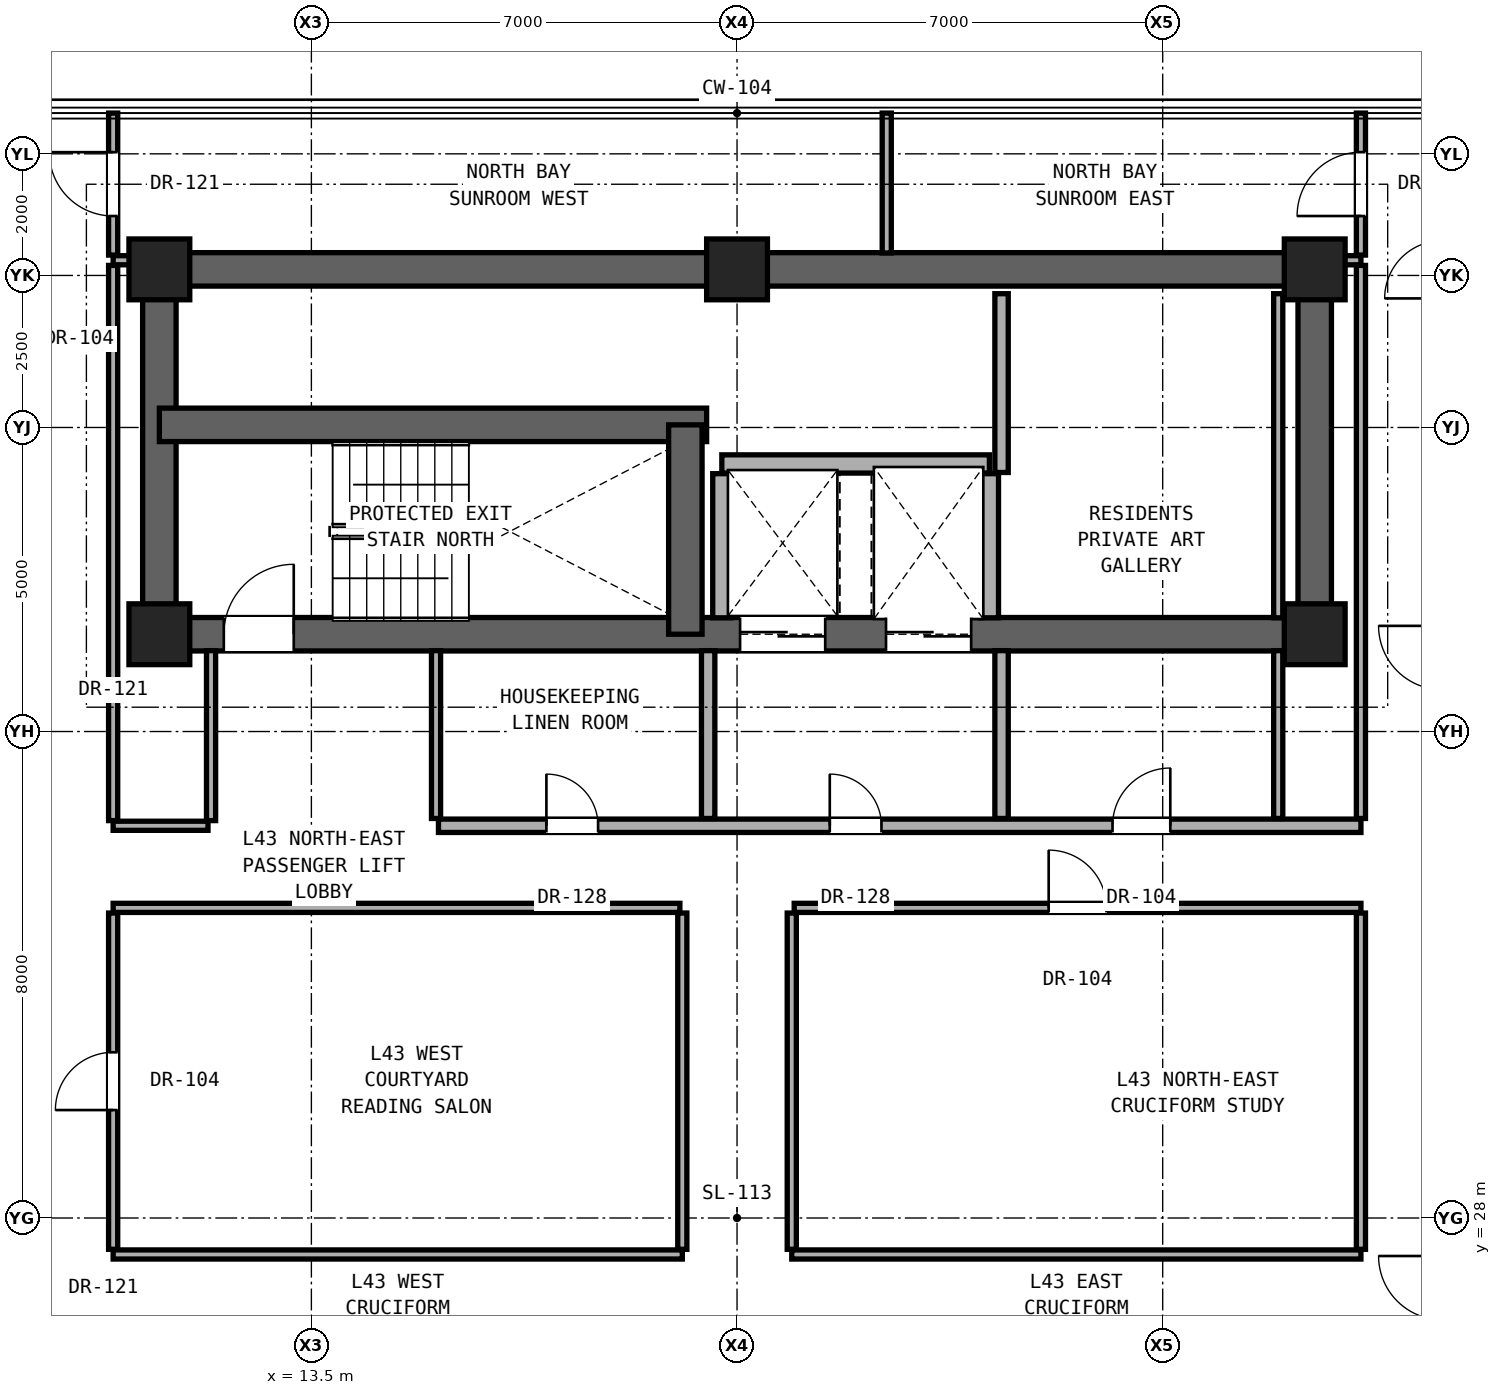
"""IFC4 building model, lengths in metres.
Left out: names, types, materials, properties, quantities, classifications, styles, units other than length and angle.
Written with IfcOpenShell. Run it as: python <this file> out.ifc"""

import sys

from ifc_helpers import new_model, si_unit, direction, frame, frame_2d, origin, origin_2d, place, context, subcontext, project, spatial, rectangle, extrude, element, fill, save


model = new_model("IFC4")
c1 = context("Model", 3, precision=1e-05, world=origin(), true_north=direction((0.0, 1.0)))
c2 = subcontext(c1, "Body", "Model", "MODEL_VIEW")
j1 = project(units=[si_unit("LENGTHUNIT", "METRE"), si_unit("PLANEANGLEUNIT", "RADIAN")], contexts=[c1])
p1 = place(None, origin())
s1 = spatial("IfcSite", under=j1, at=p1, CompositionType="ELEMENT")
p2 = place(p1, origin())
s2 = spatial("IfcBuilding", under=s1, at=p2, CompositionType="ELEMENT")
p3 = place(p2, frame((0.0, 0.0, 154.4)))
s3 = spatial("IfcBuildingStorey", under=s2, at=p3, CompositionType="ELEMENT", Elevation=154.4)
for number, where, z_axis, x_axis in (
    (1, (11.0, 37.6, 0.0), (0.0, 0.0, 1.0), (1.0, 0.0, 0.0)),
    (2, (30.0, 37.6, 0.0), (0.0, 0.0, 1.0), (1.0, 0.0, 0.0)),
    (3, (11.0, 43.6, 0.0), (0.0, 0.0, 1.0), (1.0, 0.0, 0.0)),
    (4, (20.5, 43.6, 0.0), (0.0, 0.0, 1.0), (1.0, 0.0, 0.0)),
    (5, (30.0, 43.6, 0.0), (0.0, 0.0, 1.0), (1.0, 0.0, 0.0)),
):
    element("IfcColumn", number, at=place(p3, frame(where, z_axis=z_axis, x_axis=x_axis)), inside=s3, PredefinedType="COLUMN", context=c2, shape_type="SweptSolid", body=[
        extrude(rectangle(XDim=1.0, YDim=1.0, at=origin_2d()), origin(), (0.0, 0.0, 1.0), 3.25),
    ])
p4 = place(p3, frame((11.0, 43.6, 0.0), z_axis=(0.0, 0.0, 1.0), x_axis=(1.0, 0.0, 0.0)))
e6 = element("IfcWall", 6, at=p4, inside=s3, PredefinedType="SHEAR", context=c2, shape_type="SweptSolid", body=[
    extrude(rectangle(XDim=19.0, YDim=0.55, at=frame_2d((9.5, 0.0))), origin(), (0.0, 0.0, 1.0), 3.05),
])
for number, where, z_axis, x_axis in (
    (7, (11.0, 37.6, 0.0), (0.0, 0.0, 1.0), (0.0, 1.0, 0.0)),
    (8, (30.0, 37.6, 0.0), (0.0, 0.0, 1.0), (0.0, 1.0, 0.0)),
):
    element("IfcWall", number, at=place(p3, frame(where, z_axis=z_axis, x_axis=x_axis)), inside=s3, PredefinedType="SHEAR", context=c2, shape_type="SweptSolid", body=[
        extrude(rectangle(XDim=6.0, YDim=0.55, at=frame_2d((3.0, 0.0))), origin(), (0.0, 0.0, 1.0), 3.05),
    ])
p5 = place(p3, frame((11.0, 37.6, 0.0), z_axis=(0.0, 0.0, 1.0), x_axis=(1.0, 0.0, 0.0)))
e9 = element("IfcWall", 9, at=p5, inside=s3, PredefinedType="SHEAR", context=c2, shape_type="SweptSolid", body=[
    extrude(rectangle(XDim=19.0, YDim=0.55, at=frame_2d((9.5, 0.0))), origin(), (0.0, 0.0, 1.0), 3.05),
])
p6 = place(p5, frame((1.06, 0.0, 0.0)))
e10 = element("IfcOpeningElement", 10, at=p6, cuts=e9, PredefinedType="OPENING", context=c2, shape_type="SweptSolid", body=[
    extrude(rectangle(XDim=1.15, YDim=2.2, at=frame_2d((0.575, 1.1))), frame((0.0, 0.285, 0.0), z_axis=(0.0, -1.0, 0.0), x_axis=(1.0, 0.0, 0.0)), (0.0, 0.0, 1.0), 0.57),
])
p7 = place(p5, frame((9.55, 0.0, 0.0)))
e11 = element("IfcOpeningElement", 11, at=p7, cuts=e9, PredefinedType="OPENING", context=c2, shape_type="SweptSolid", body=[
    extrude(rectangle(XDim=1.4, YDim=2.35, at=frame_2d((0.7, 1.175))), frame((0.0, 0.285, 0.0), z_axis=(0.0, -1.0, 0.0), x_axis=(1.0, 0.0, 0.0)), (0.0, 0.0, 1.0), 0.57),
])
p8 = place(p5, frame((11.95, 0.0, 0.0)))
e12 = element("IfcOpeningElement", 12, at=p8, cuts=e9, PredefinedType="OPENING", context=c2, shape_type="SweptSolid", body=[
    extrude(rectangle(XDim=1.4, YDim=2.35, at=frame_2d((0.7, 1.175))), frame((0.0, 0.285, 0.0), z_axis=(0.0, -1.0, 0.0), x_axis=(1.0, 0.0, 0.0)), (0.0, 0.0, 1.0), 0.57),
])
p9 = place(p3, frame((11.0, 41.043, 0.0), z_axis=(0.0, 0.0, 1.0), x_axis=(1.0, 0.0, 0.0)))
e13 = element("IfcWall", 13, at=p9, inside=s3, PredefinedType="SHEAR", context=c2, shape_type="SweptSolid", body=[
    extrude(rectangle(XDim=9.0, YDim=0.55, at=frame_2d((4.5, 0.0))), origin(), (0.0, 0.0, 1.0), 3.05),
])
p10 = place(p3, frame((19.65, 37.6, 0.0), z_axis=(0.0, 0.0, 1.0), x_axis=(0.0, 1.0, 0.0)))
e14 = element("IfcWall", 14, at=p10, inside=s3, PredefinedType="SHEAR", context=c2, shape_type="SweptSolid", body=[
    extrude(rectangle(XDim=3.443, YDim=0.55, at=frame_2d((1.721, 0.0))), origin(), (0.0, 0.0, 1.0), 3.05),
])
for number, where, z_axis, x_axis in (
    (15, (10.24, 27.4, 0.0), (0.0, 0.0, 1.0), (1.0, 0.0, 0.0)),
    (16, (21.4, 27.4, 0.0), (0.0, 0.0, 1.0), (1.0, 0.0, 0.0)),
):
    element("IfcWall", number, at=place(p3, frame(where, z_axis=z_axis, x_axis=x_axis)), inside=s3, PredefinedType="PARTITIONING", context=c2, shape_type="SweptSolid", body=[
        extrude(rectangle(XDim=9.36, YDim=0.15, at=frame_2d((4.68, 0.0))), origin(), (0.0, 0.0, 1.0), 2.186),
    ])
p11 = place(p3, frame((10.24, 33.1, 0.0), z_axis=(0.0, 0.0, 1.0), x_axis=(1.0, 0.0, 0.0)))
e17 = element("IfcWall", 17, at=p11, inside=s3, PredefinedType="PARTITIONING", context=c2, shape_type="SweptSolid", body=[
    extrude(rectangle(XDim=9.32, YDim=0.15, at=frame_2d((4.66, 0.0))), origin(), (0.0, 0.0, 1.0), 2.186),
])
p12 = place(p3, frame((21.44, 33.1, 0.0), z_axis=(0.0, 0.0, 1.0), x_axis=(1.0, 0.0, 0.0)))
e18 = element("IfcWall", 18, at=p12, inside=s3, PredefinedType="PARTITIONING", context=c2, shape_type="SweptSolid", body=[
    extrude(rectangle(XDim=9.32, YDim=0.15, at=frame_2d((4.66, 0.0))), origin(), (0.0, 0.0, 1.0), 2.186),
])
p13 = place(p12, frame((4.185, 0.0, 0.0)))
e19 = element("IfcOpeningElement", 19, at=p13, cuts=e18, PredefinedType="OPENING", context=c2, shape_type="SweptSolid", body=[
    extrude(rectangle(XDim=0.95, YDim=2.15, at=frame_2d((0.475, 1.075))), frame((0.0, 0.085, 0.0), z_axis=(0.0, -1.0, 0.0), x_axis=(1.0, 0.0, 0.0)), (0.0, 0.0, 1.0), 0.17),
])
p14 = place(p3, frame((10.24, 34.45, 0.0), z_axis=(0.0, 0.0, 1.0), x_axis=(1.0, 0.0, 0.0)))
e20 = element("IfcWall", 20, at=p14, inside=s3, PredefinedType="PARTITIONING", context=c2, shape_type="SweptSolid", body=[
    extrude(rectangle(XDim=1.56, YDim=0.15, at=frame_2d((0.78, 0.0))), origin(), (0.0, 0.0, 1.0), 2.186),
])
p15 = place(p3, frame((15.59, 34.45, 0.0), z_axis=(0.0, 0.0, 1.0), x_axis=(1.0, 0.0, 0.0)))
e21 = element("IfcWall", 21, at=p15, inside=s3, PredefinedType="SOLIDWALL", context=c2, shape_type="SweptSolid", body=[
    extrude(rectangle(XDim=15.17, YDim=0.22, at=frame_2d((7.585, 0.0))), origin(), (0.0, 0.0, 1.0), 2.186),
])
p16 = place(p15, frame((6.435, 0.0, 0.0)))
e22 = element("IfcOpeningElement", 22, at=p16, cuts=e21, PredefinedType="OPENING", context=c2, shape_type="SweptSolid", body=[
    extrude(rectangle(XDim=0.85, YDim=2.01, at=frame_2d((0.425, 1.005))), frame((0.0, 0.12, 0.0), z_axis=(0.0, -1.0, 0.0), x_axis=(1.0, 0.0, 0.0)), (0.0, 0.0, 1.0), 0.24),
])
p17 = place(p15, frame((11.085, 0.0, 0.0)))
e23 = element("IfcOpeningElement", 23, at=p17, cuts=e21, PredefinedType="OPENING", context=c2, shape_type="SweptSolid", body=[
    extrude(rectangle(XDim=0.95, YDim=2.15, at=frame_2d((0.475, 1.075))), frame((0.0, 0.12, 0.0), z_axis=(0.0, -1.0, 0.0), x_axis=(1.0, 0.0, 0.0)), (0.0, 0.0, 1.0), 0.24),
])
p18 = place(p15, frame((1.775, 0.0, 0.0)))
e24 = element("IfcOpeningElement", 24, at=p18, cuts=e21, PredefinedType="OPENING", context=c2, shape_type="SweptSolid", body=[
    extrude(rectangle(XDim=0.85, YDim=2.01, at=frame_2d((0.425, 1.005))), frame((0.0, 0.12, 0.0), z_axis=(0.0, -1.0, 0.0), x_axis=(1.0, 0.0, 0.0)), (0.0, 0.0, 1.0), 0.24),
])
p19 = place(p3, frame((20.25, 40.4, 0.0), z_axis=(0.0, 0.0, 1.0), x_axis=(1.0, 0.0, 0.0)))
e25 = element("IfcWall", 25, at=p19, inside=s3, PredefinedType="SOLIDWALL", context=c2, shape_type="SweptSolid", body=[
    extrude(rectangle(XDim=4.4, YDim=0.3, at=frame_2d((2.2, 0.0))), origin(), (0.0, 0.0, 1.0), 3.05),
])
for number, where, z_axis, x_axis in (
    (26, (10.24, 43.75, 0.0), (0.0, 0.0, 1.0), (1.0, 0.0, 0.0)),
    (27, (30.27, 43.75, 0.0), (0.0, 0.0, 1.0), (1.0, 0.0, 0.0)),
):
    element("IfcWall", number, at=place(p3, frame(where, z_axis=z_axis, x_axis=x_axis)), inside=s3, PredefinedType="PARTITIONING", context=c2, shape_type="SweptSolid", body=[
        extrude(rectangle(XDim=0.49, YDim=0.15, at=frame_2d((0.245, 0.0))), origin(), (0.0, 0.0, 1.0), 3.05),
    ])
p20 = place(p3, frame((10.24, 27.485, 0.0), z_axis=(0.0, 0.0, 1.0), x_axis=(0.0, 1.0, 0.0)))
e28 = element("IfcWall", 28, at=p20, inside=s3, PredefinedType="PARTITIONING", context=c2, shape_type="SweptSolid", body=[
    extrude(rectangle(XDim=5.53, YDim=0.15, at=frame_2d((2.765, 0.0))), origin(), (0.0, 0.0, 1.0), 2.346),
])
p21 = place(p20, frame((2.29, 0.0, 0.0)))
e29 = element("IfcOpeningElement", 29, at=p21, cuts=e28, PredefinedType="OPENING", context=c2, shape_type="SweptSolid", body=[
    extrude(rectangle(XDim=0.95, YDim=2.15, at=frame_2d((0.475, 1.075))), frame((0.0, 0.085, 0.0), z_axis=(0.0, -1.0, 0.0), x_axis=(1.0, 0.0, 0.0)), (0.0, 0.0, 1.0), 0.17),
])
p22 = place(p3, frame((10.24, 34.535, 0.0), z_axis=(0.0, 0.0, 1.0), x_axis=(0.0, 1.0, 0.0)))
e30 = element("IfcWall", 30, at=p22, inside=s3, PredefinedType="PARTITIONING", context=c2, shape_type="SweptSolid", body=[
    extrude(rectangle(XDim=9.13, YDim=0.15, at=frame_2d((4.565, 0.0))), origin(), (0.0, 0.0, 1.0), 2.442),
])
p23 = place(p3, frame((10.24, 43.835, 0.0), z_axis=(0.0, 0.0, 1.0), x_axis=(0.0, 1.0, 0.0)))
e31 = element("IfcWall", 31, at=p23, inside=s3, PredefinedType="PARTITIONING", context=c2, shape_type="SweptSolid", body=[
    extrude(rectangle(XDim=2.335, YDim=0.15, at=frame_2d((1.167, 0.0))), origin(), (0.0, 0.0, 1.0), 3.05),
])
p24 = place(p23, frame((0.643, 0.0, 0.0)))
e32 = element("IfcOpeningElement", 32, at=p24, cuts=e31, PredefinedType="OPENING", context=c2, shape_type="SweptSolid", body=[
    extrude(rectangle(XDim=1.05, YDim=2.2, at=frame_2d((0.525, 1.1))), frame((0.0, 0.085, 0.0), z_axis=(0.0, -1.0, 0.0), x_axis=(1.0, 0.0, 0.0)), (0.0, 0.0, 1.0), 0.17),
])
p25 = place(p3, frame((11.85, 34.535, 0.0), z_axis=(0.0, 0.0, 1.0), x_axis=(0.0, 1.0, 0.0)))
e33 = element("IfcWall", 33, at=p25, inside=s3, PredefinedType="PARTITIONING", context=c2, shape_type="SweptSolid", body=[
    extrude(rectangle(XDim=2.795, YDim=0.15, at=frame_2d((1.397, 0.0))), origin(), (0.0, 0.0, 1.0), 3.05),
])
p26 = place(p3, frame((15.55, 34.57, 0.0), z_axis=(0.0, 0.0, 1.0), x_axis=(0.0, 1.0, 0.0)))
e34 = element("IfcWall", 34, at=p26, inside=s3, PredefinedType="PARTITIONING", context=c2, shape_type="SweptSolid", body=[
    extrude(rectangle(XDim=2.76, YDim=0.15, at=frame_2d((1.38, 0.0))), origin(), (0.0, 0.0, 1.0), 3.05),
])
p27 = place(p3, frame((19.6, 27.485, 0.0), z_axis=(0.0, 0.0, 1.0), x_axis=(0.0, 1.0, 0.0)))
e35 = element("IfcWall", 35, at=p27, inside=s3, PredefinedType="PARTITIONING", context=c2, shape_type="SweptSolid", body=[
    extrude(rectangle(XDim=5.53, YDim=0.15, at=frame_2d((2.765, 0.0))), origin(), (0.0, 0.0, 1.0), 2.186),
])
p28 = place(p3, frame((20.025, 34.57, 0.0), z_axis=(0.0, 0.0, 1.0), x_axis=(0.0, 1.0, 0.0)))
e36 = element("IfcWall", 36, at=p28, inside=s3, PredefinedType="SOLIDWALL", context=c2, shape_type="SweptSolid", body=[
    extrude(rectangle(XDim=2.76, YDim=0.22, at=frame_2d((1.38, 0.0))), origin(), (0.0, 0.0, 1.0), 3.05),
])
p29 = place(p3, frame((20.25, 37.87, 0.0), z_axis=(0.0, 0.0, 1.0), x_axis=(0.0, 1.0, 0.0)))
e37 = element("IfcWall", 37, at=p29, inside=s3, PredefinedType="SOLIDWALL", context=c2, shape_type="SweptSolid", body=[
    extrude(rectangle(XDim=2.37, YDim=0.3, at=frame_2d((1.185, 0.0))), origin(), (0.0, 0.0, 1.0), 3.05),
])
p30 = place(p3, frame((21.4, 27.485, 0.0), z_axis=(0.0, 0.0, 1.0), x_axis=(0.0, 1.0, 0.0)))
e38 = element("IfcWall", 38, at=p30, inside=s3, PredefinedType="PARTITIONING", context=c2, shape_type="SweptSolid", body=[
    extrude(rectangle(XDim=5.53, YDim=0.15, at=frame_2d((2.765, 0.0))), origin(), (0.0, 0.0, 1.0), 2.186),
])
p31 = place(p3, frame((22.962, 43.87, 0.0), z_axis=(0.0, 0.0, 1.0), x_axis=(0.0, 1.0, 0.0)))
e39 = element("IfcWall", 39, at=p31, inside=s3, PredefinedType="PARTITIONING", context=c2, shape_type="SweptSolid", body=[
    extrude(rectangle(XDim=2.3, YDim=0.15, at=frame_2d((1.15, 0.0))), origin(), (0.0, 0.0, 1.0), 3.05),
])
p32 = place(p3, frame((24.65, 37.87, 0.0), z_axis=(0.0, 0.0, 1.0), x_axis=(0.0, 1.0, 0.0)))
e40 = element("IfcWall", 40, at=p32, inside=s3, PredefinedType="SOLIDWALL", context=c2, shape_type="SweptSolid", body=[
    extrude(rectangle(XDim=2.37, YDim=0.3, at=frame_2d((1.185, 0.0))), origin(), (0.0, 0.0, 1.0), 3.05),
])
p33 = place(p3, frame((24.85, 34.57, 0.0), z_axis=(0.0, 0.0, 1.0), x_axis=(0.0, 1.0, 0.0)))
e41 = element("IfcWall", 41, at=p33, inside=s3, PredefinedType="SOLIDWALL", context=c2, shape_type="SweptSolid", body=[
    extrude(rectangle(XDim=2.76, YDim=0.22, at=frame_2d((1.38, 0.0))), origin(), (0.0, 0.0, 1.0), 3.05),
])
p34 = place(p3, frame((24.85, 40.26, 0.0), z_axis=(0.0, 0.0, 1.0), x_axis=(0.0, 1.0, 0.0)))
e42 = element("IfcWall", 42, at=p34, inside=s3, PredefinedType="SOLIDWALL", context=c2, shape_type="SweptSolid", body=[
    extrude(rectangle(XDim=2.94, YDim=0.22, at=frame_2d((1.47, 0.0))), origin(), (0.0, 0.0, 1.0), 3.05),
])
p35 = place(p3, frame((29.4, 34.57, 0.0), z_axis=(0.0, 0.0, 1.0), x_axis=(0.0, 1.0, 0.0)))
e43 = element("IfcWall", 43, at=p35, inside=s3, PredefinedType="PARTITIONING", context=c2, shape_type="SweptSolid", body=[
    extrude(rectangle(XDim=2.76, YDim=0.15, at=frame_2d((1.38, 0.0))), origin(), (0.0, 0.0, 1.0), 3.05),
])
p36 = place(p3, frame((29.4, 37.87, 0.0), z_axis=(0.0, 0.0, 1.0), x_axis=(0.0, 1.0, 0.0)))
e44 = element("IfcWall", 44, at=p36, inside=s3, PredefinedType="PARTITIONING", context=c2, shape_type="SweptSolid", body=[
    extrude(rectangle(XDim=5.33, YDim=0.15, at=frame_2d((2.665, 0.0))), origin(), (0.0, 0.0, 1.0), 3.05),
])
p37 = place(p3, frame((30.76, 27.485, 0.0), z_axis=(0.0, 0.0, 1.0), x_axis=(0.0, 1.0, 0.0)))
e45 = element("IfcWall", 45, at=p37, inside=s3, PredefinedType="PARTITIONING", context=c2, shape_type="SweptSolid", body=[
    extrude(rectangle(XDim=5.53, YDim=0.15, at=frame_2d((2.765, 0.0))), origin(), (0.0, 0.0, 1.0), 2.346),
])
p38 = place(p3, frame((30.76, 34.57, 0.0), z_axis=(0.0, 0.0, 1.0), x_axis=(0.0, 1.0, 0.0)))
e46 = element("IfcWall", 46, at=p38, inside=s3, PredefinedType="PARTITIONING", context=c2, shape_type="SweptSolid", body=[
    extrude(rectangle(XDim=9.095, YDim=0.15, at=frame_2d((4.547, 0.0))), origin(), (0.0, 0.0, 1.0), 2.442),
])
p39 = place(p3, frame((30.76, 43.835, 0.0), z_axis=(0.0, 0.0, 1.0), x_axis=(0.0, 1.0, 0.0)))
e47 = element("IfcWall", 47, at=p39, inside=s3, PredefinedType="PARTITIONING", context=c2, shape_type="SweptSolid", body=[
    extrude(rectangle(XDim=2.335, YDim=0.15, at=frame_2d((1.167, 0.0))), origin(), (0.0, 0.0, 1.0), 3.05),
])
p40 = place(p39, frame((0.643, 0.0, 0.0)))
e48 = element("IfcOpeningElement", 48, at=p40, cuts=e47, PredefinedType="OPENING", context=c2, shape_type="SweptSolid", body=[
    extrude(rectangle(XDim=1.05, YDim=2.2, at=frame_2d((0.525, 1.1))), frame((0.0, 0.085, 0.0), z_axis=(0.0, -1.0, 0.0), x_axis=(1.0, 0.0, 0.0)), (0.0, 0.0, 1.0), 0.17),
])
p41 = place(p6, origin())
e49 = element("IfcDoor", 49, at=p41, inside=s3, OperationType="SINGLE_SWING_RIGHT", PredefinedType="DOOR", context=c2, shape_type="SweptSolid", body=[
    extrude(rectangle(XDim=1.15, YDim=2.2, at=frame_2d((0.575, 1.1))), frame((0.0, 0.025, 0.0), z_axis=(0.0, -1.0, 0.0), x_axis=(1.0, 0.0, 0.0)), (0.0, 0.0, 1.0), 0.05),
])
fill(e10, e49)
p42 = place(p16, origin())
e50 = element("IfcDoor", 50, at=p42, inside=s3, OperationType="SINGLE_SWING_LEFT", PredefinedType="DOOR", context=c2, shape_type="SweptSolid", body=[
    extrude(rectangle(XDim=0.85, YDim=2.01, at=frame_2d((0.425, 1.005))), frame((0.0, 0.025, 0.0), z_axis=(0.0, -1.0, 0.0), x_axis=(1.0, 0.0, 0.0)), (0.0, 0.0, 1.0), 0.05),
])
fill(e22, e50)
p43 = place(p17, origin())
e51 = element("IfcDoor", 51, at=p43, inside=s3, OperationType="SINGLE_SWING_RIGHT", PredefinedType="DOOR", context=c2, shape_type="SweptSolid", body=[
    extrude(rectangle(XDim=0.95, YDim=2.15, at=frame_2d((0.475, 1.075))), frame((0.0, 0.025, 0.0), z_axis=(0.0, -1.0, 0.0), x_axis=(1.0, 0.0, 0.0)), (0.0, 0.0, 1.0), 0.05),
])
fill(e23, e51)
p44 = place(p18, origin())
e52 = element("IfcDoor", 52, at=p44, inside=s3, OperationType="SINGLE_SWING_LEFT", PredefinedType="DOOR", context=c2, shape_type="SweptSolid", body=[
    extrude(rectangle(XDim=0.85, YDim=2.01, at=frame_2d((0.425, 1.005))), frame((0.0, 0.025, 0.0), z_axis=(0.0, -1.0, 0.0), x_axis=(1.0, 0.0, 0.0)), (0.0, 0.0, 1.0), 0.05),
])
fill(e24, e52)
p45 = place(p21, origin())
e53 = element("IfcDoor", 53, at=p45, inside=s3, OperationType="SINGLE_SWING_LEFT", PredefinedType="DOOR", context=c2, shape_type="SweptSolid", body=[
    extrude(rectangle(XDim=0.95, YDim=2.15, at=frame_2d((0.475, 1.075))), frame((0.0, 0.025, 0.0), z_axis=(0.0, -1.0, 0.0), x_axis=(1.0, 0.0, 0.0)), (0.0, 0.0, 1.0), 0.05),
])
fill(e29, e53)
p46 = place(p13, origin())
e54 = element("IfcDoor", 54, at=p46, inside=s3, OperationType="SINGLE_SWING_LEFT", PredefinedType="DOOR", context=c2, shape_type="SweptSolid", body=[
    extrude(rectangle(XDim=0.95, YDim=2.15, at=frame_2d((0.475, 1.075))), frame((0.0, 0.025, 0.0), z_axis=(0.0, -1.0, 0.0), x_axis=(1.0, 0.0, 0.0)), (0.0, 0.0, 1.0), 0.05),
])
fill(e19, e54)
p47 = place(p24, origin())
e55 = element("IfcDoor", 55, at=p47, inside=s3, OperationType="SINGLE_SWING_RIGHT", PredefinedType="DOOR", context=c2, shape_type="SweptSolid", body=[
    extrude(rectangle(XDim=1.05, YDim=2.2, at=frame_2d((0.525, 1.1))), frame((0.0, 0.025, 0.0), z_axis=(0.0, -1.0, 0.0), x_axis=(1.0, 0.0, 0.0)), (0.0, 0.0, 1.0), 0.05),
])
fill(e32, e55)
p48 = place(p40, origin())
e56 = element("IfcDoor", 56, at=p48, inside=s3, OperationType="SINGLE_SWING_LEFT", PredefinedType="DOOR", context=c2, shape_type="SweptSolid", body=[
    extrude(rectangle(XDim=1.05, YDim=2.2, at=frame_2d((0.525, 1.1))), frame((0.0, 0.025, 0.0), z_axis=(0.0, -1.0, 0.0), x_axis=(1.0, 0.0, 0.0)), (0.0, 0.0, 1.0), 0.05),
])
fill(e48, e56)
p49 = place(p7, origin())
e57 = element("IfcDoor", 57, at=p49, inside=s3, OperationType="DOUBLE_DOOR_SLIDING", PredefinedType="DOOR", context=c2, shape_type="SweptSolid", body=[
    extrude(rectangle(XDim=1.4, YDim=2.35, at=frame_2d((0.7, 1.175))), frame((0.0, 0.025, 0.0), z_axis=(0.0, -1.0, 0.0), x_axis=(1.0, 0.0, 0.0)), (0.0, 0.0, 1.0), 0.05),
])
fill(e11, e57)
p50 = place(p8, origin())
e58 = element("IfcDoor", 58, at=p50, inside=s3, OperationType="DOUBLE_DOOR_SLIDING", PredefinedType="DOOR", context=c2, shape_type="SweptSolid", body=[
    extrude(rectangle(XDim=1.4, YDim=2.35, at=frame_2d((0.7, 1.175))), frame((0.0, 0.025, 0.0), z_axis=(0.0, -1.0, 0.0), x_axis=(1.0, 0.0, 0.0)), (0.0, 0.0, 1.0), 0.05),
])
fill(e12, e58)
save(model, sys.argv[1])
